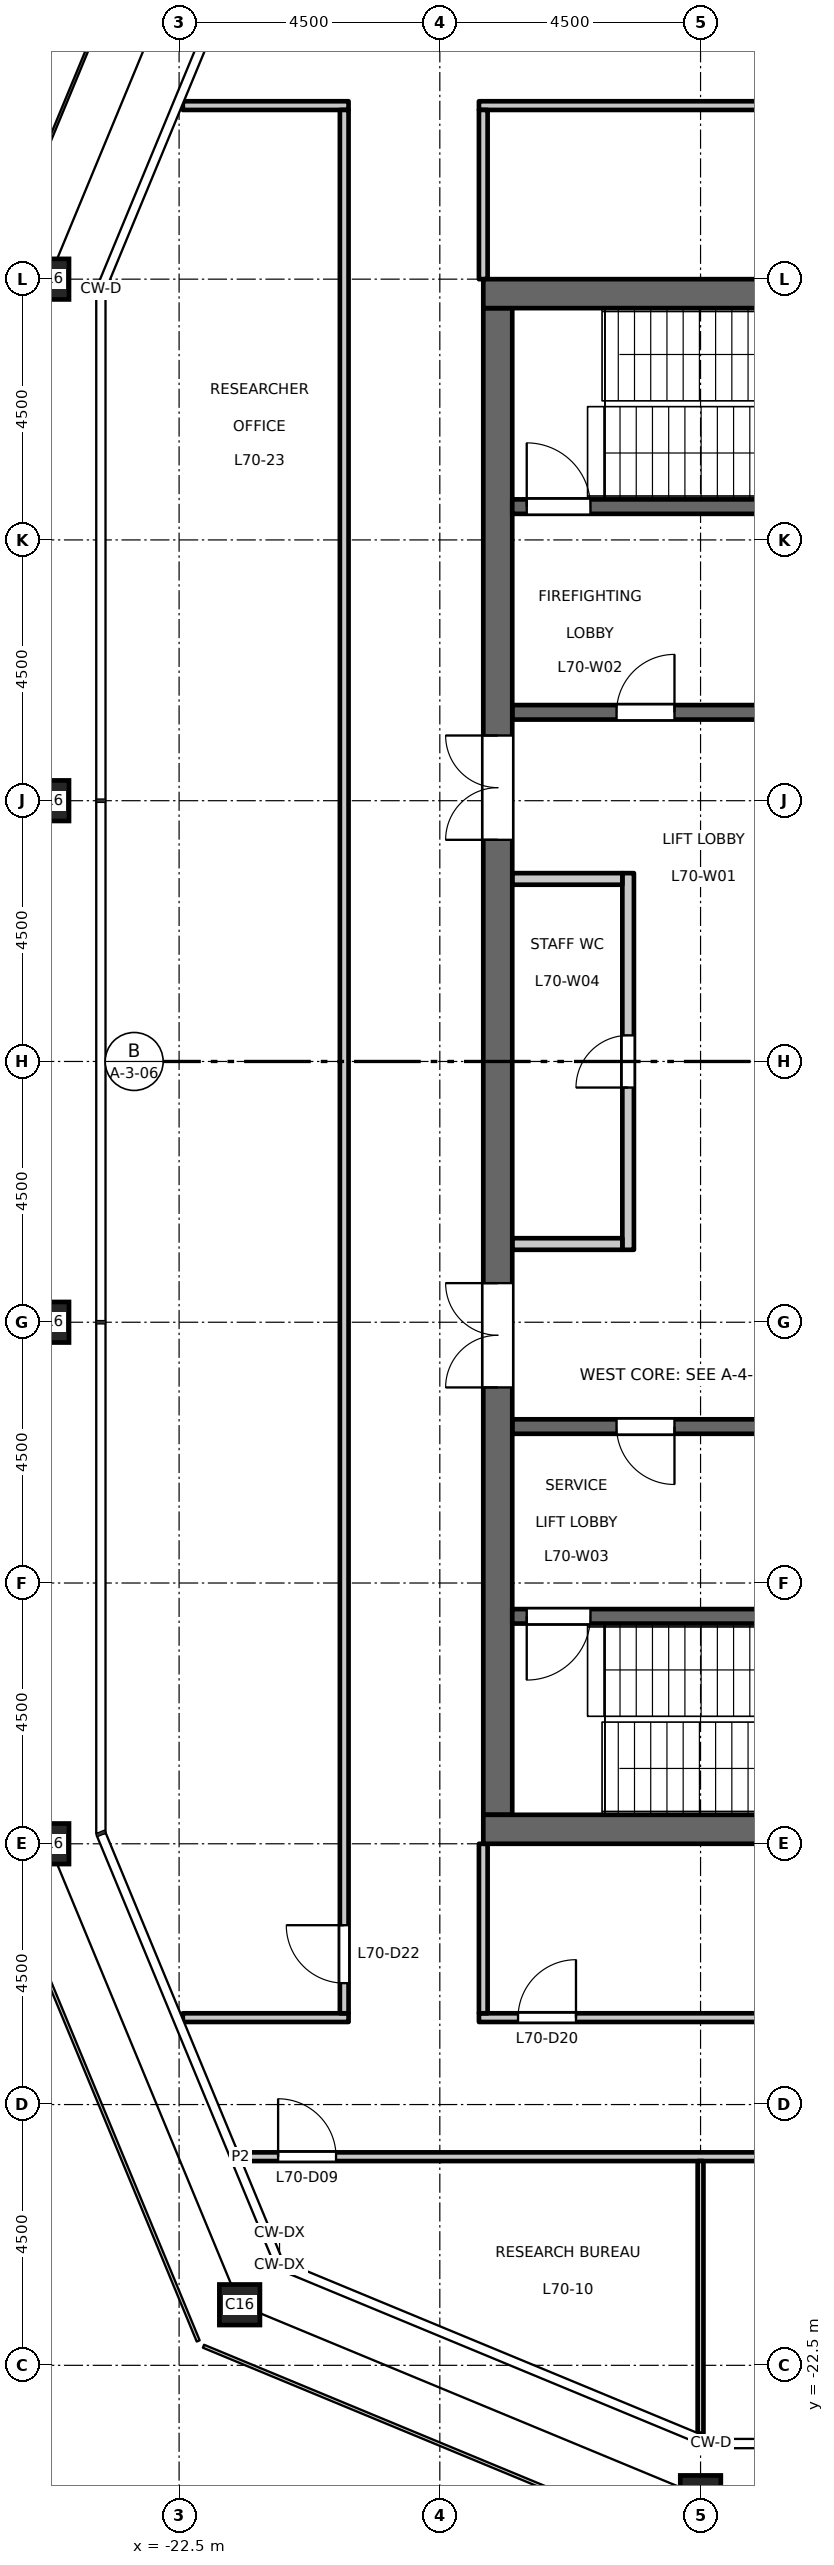
"""IFC4 building model, lengths in metres.
Left out: names, types, materials, properties, quantities, classifications, styles, units other than length and angle.
Written with IfcOpenShell. Run it as: python <this file> out.ifc"""

import sys

from ifc_helpers import new_model, si_unit, direction, frame, frame_2d, origin, origin_2d, place, context, subcontext, project, spatial, rectangle, hollow_rectangle, extrude, element, fill, save


model = new_model("IFC4")
c1 = context("Model", 3, precision=1e-05, world=origin(), true_north=direction((0.0, 1.0)))
c2 = subcontext(c1, "Body", "Model", "MODEL_VIEW")
j1 = project(units=[si_unit("LENGTHUNIT", "METRE"), si_unit("PLANEANGLEUNIT", "RADIAN")], contexts=[c1])
p1 = place(None, origin())
s1 = spatial("IfcSite", under=j1, at=p1, CompositionType="ELEMENT")
p2 = place(p1, origin())
s2 = spatial("IfcBuilding", under=s1, at=p2, CompositionType="ELEMENT")
p3 = place(p2, frame((0.0, 0.0, 325.7)))
s3 = spatial("IfcBuildingStorey", under=s2, at=p3, CompositionType="ELEMENT", Elevation=325.7)
for number, where, z_axis, x_axis in (
    (1, (-13.5, -24.75, 0.0), (0.0, 0.0, 1.0), (1.0, 0.0, 0.0)),
    (2, (-24.75, 13.5, 0.0), (0.0, 0.0, 1.0), (1.0, 0.0, 0.0)),
    (3, (-24.75, 4.5, 0.0), (0.0, 0.0, 1.0), (1.0, 0.0, 0.0)),
    (4, (-24.75, -4.5, 0.0), (0.0, 0.0, 1.0), (1.0, 0.0, 0.0)),
    (5, (-24.75, -13.5, 0.0), (0.0, 0.0, 1.0), (1.0, 0.0, 0.0)),
    (6, (-21.455, -21.455, 0.0), (0.0, 0.0, 1.0), (1.0, 0.0, 0.0)),
):
    element("IfcColumn", number, at=place(p3, frame(where, z_axis=z_axis, x_axis=x_axis)), inside=s3, PredefinedType="COLUMN", context=c2, shape_type="SweptSolid", body=[
        extrude(hollow_rectangle(XDim=0.7, YDim=0.7, WallThickness=0.036, at=origin_2d()), origin(), (0.0, 0.0, 1.0), 4.5),
    ])
p4 = place(p3, frame((-14.75, -3.25, 0.0), z_axis=(0.0, 0.0, 1.0), x_axis=(0.0, 1.0, 0.0)))
e7 = element("IfcWall", 7, at=p4, inside=s3, PredefinedType="PARTITIONING", context=c2, shape_type="SweptSolid", body=[
    extrude(rectangle(XDim=6.5, YDim=0.2, at=frame_2d((3.25, 0.0))), origin(), (0.0, 0.0, 1.0), 4.35),
])
p5 = place(p4, frame((2.8, 0.0, 0.0)))
e8 = element("IfcOpeningElement", 8, at=p5, cuts=e7, PredefinedType="OPENING", context=c2, shape_type="SweptSolid", body=[
    extrude(rectangle(XDim=0.9, YDim=2.1, at=frame_2d((0.45, 1.05))), frame((0.0, 0.11, 0.0), z_axis=(0.0, -1.0, 0.0), x_axis=(1.0, 0.0, 0.0)), (0.0, 0.0, 1.0), 0.22),
])
for number, where, z_axis, x_axis in (
    (9, (-14.85, 3.15, 0.0), (0.0, 0.0, 1.0), (-1.0, 0.0, 0.0)),
    (10, (-14.85, -3.15, 0.0), (0.0, 0.0, 1.0), (-1.0, 0.0, 0.0)),
):
    element("IfcWall", number, at=place(p3, frame(where, z_axis=z_axis, x_axis=x_axis)), inside=s3, PredefinedType="PARTITIONING", context=c2, shape_type="SweptSolid", body=[
        extrude(rectangle(XDim=1.9, YDim=0.2, at=frame_2d((0.95, 0.0))), origin(), (0.0, 0.0, 1.0), 4.35),
    ])
p6 = place(p3, frame((-12.15, 6.025, 0.0), z_axis=(0.0, 0.0, 1.0), x_axis=(-1.0, 0.0, 0.0)))
e11 = element("IfcWall", 11, at=p6, inside=s3, PredefinedType="SHEAR", context=c2, shape_type="SweptSolid", body=[
    extrude(rectangle(XDim=4.6, YDim=0.25, at=frame_2d((2.3, 0.0))), origin(), (0.0, 0.0, 1.0), 4.35),
])
p7 = place(p6, frame((1.8, 0.0, 0.0)))
e12 = element("IfcOpeningElement", 12, at=p7, cuts=e11, PredefinedType="OPENING", context=c2, shape_type="SweptSolid", body=[
    extrude(rectangle(XDim=1.0, YDim=2.1, at=frame_2d((0.5, 1.05))), frame((0.0, 0.135, 0.0), z_axis=(0.0, -1.0, 0.0), x_axis=(1.0, 0.0, 0.0)), (0.0, 0.0, 1.0), 0.27),
])
p8 = place(p3, frame((-12.15, -6.3, 0.0), z_axis=(0.0, 0.0, 1.0), x_axis=(-1.0, 0.0, 0.0)))
e13 = element("IfcWall", 13, at=p8, inside=s3, PredefinedType="SHEAR", context=c2, shape_type="SweptSolid", body=[
    extrude(rectangle(XDim=4.6, YDim=0.25, at=frame_2d((2.3, 0.0))), origin(), (0.0, 0.0, 1.0), 4.35),
])
p9 = place(p8, frame((1.8, 0.0, 0.0)))
e14 = element("IfcOpeningElement", 14, at=p9, cuts=e13, PredefinedType="OPENING", context=c2, shape_type="SweptSolid", body=[
    extrude(rectangle(XDim=1.0, YDim=2.1, at=frame_2d((0.5, 1.05))), frame((0.0, 0.135, 0.0), z_axis=(0.0, -1.0, 0.0), x_axis=(1.0, 0.0, 0.0)), (0.0, 0.0, 1.0), 0.27),
])
p10 = place(p3, frame((-17.0, -13.0, 0.0), z_axis=(0.0, 0.0, 1.0), x_axis=(0.0, 1.0, 0.0)))
e15 = element("IfcWall", 15, at=p10, inside=s3, PredefinedType="SHEAR", context=c2, shape_type="SweptSolid", body=[
    extrude(rectangle(XDim=26.0, YDim=0.5, at=frame_2d((13.0, 0.0))), origin(), (0.0, 0.0, 1.0), 4.35),
])
p11 = place(p10, frame((16.825, 0.0, 0.0)))
e16 = element("IfcOpeningElement", 16, at=p11, cuts=e15, PredefinedType="OPENING", context=c2, shape_type="SweptSolid", body=[
    extrude(rectangle(XDim=1.8, YDim=2.1, at=frame_2d((0.9, 1.05))), frame((0.0, 0.26, 0.0), z_axis=(0.0, -1.0, 0.0), x_axis=(1.0, 0.0, 0.0)), (0.0, 0.0, 1.0), 0.52),
])
p12 = place(p10, frame((7.375, 0.0, 0.0)))
e17 = element("IfcOpeningElement", 17, at=p12, cuts=e15, PredefinedType="OPENING", context=c2, shape_type="SweptSolid", body=[
    extrude(rectangle(XDim=1.8, YDim=2.1, at=frame_2d((0.9, 1.05))), frame((0.0, 0.26, 0.0), z_axis=(0.0, -1.0, 0.0), x_axis=(1.0, 0.0, 0.0)), (0.0, 0.0, 1.0), 0.52),
])
p13 = place(p3, frame((-8.75, 9.575, 0.0), z_axis=(0.0, 0.0, 1.0), x_axis=(-1.0, 0.0, 0.0)))
e18 = element("IfcWall", 18, at=p13, inside=s3, PredefinedType="SHEAR", context=c2, shape_type="SweptSolid", body=[
    extrude(rectangle(XDim=8.0, YDim=0.25, at=frame_2d((4.0, 0.0))), origin(), (0.0, 0.0, 1.0), 4.35),
])
p14 = place(p13, frame((6.65, 0.0, 0.0)))
e19 = element("IfcOpeningElement", 19, at=p14, cuts=e18, PredefinedType="OPENING", context=c2, shape_type="SweptSolid", body=[
    extrude(rectangle(XDim=1.1, YDim=2.1, at=frame_2d((0.55, 1.05))), frame((0.0, 0.135, 0.0), z_axis=(0.0, -1.0, 0.0), x_axis=(1.0, 0.0, 0.0)), (0.0, 0.0, 1.0), 0.27),
])
p15 = place(p3, frame((-8.75, -9.575, 0.0), z_axis=(0.0, 0.0, 1.0), x_axis=(-1.0, 0.0, 0.0)))
e20 = element("IfcWall", 20, at=p15, inside=s3, PredefinedType="SHEAR", context=c2, shape_type="SweptSolid", body=[
    extrude(rectangle(XDim=8.0, YDim=0.25, at=frame_2d((4.0, 0.0))), origin(), (0.0, 0.0, 1.0), 4.35),
])
p16 = place(p15, frame((6.65, 0.0, 0.0)))
e21 = element("IfcOpeningElement", 21, at=p16, cuts=e20, PredefinedType="OPENING", context=c2, shape_type="SweptSolid", body=[
    extrude(rectangle(XDim=1.1, YDim=2.1, at=frame_2d((0.55, 1.05))), frame((0.0, 0.135, 0.0), z_axis=(0.0, -1.0, 0.0), x_axis=(1.0, 0.0, 0.0)), (0.0, 0.0, 1.0), 0.27),
])
for number, where, z_axis, x_axis in (
    (22, (-8.25, 13.25, 0.0), (0.0, 0.0, 1.0), (-1.0, 0.0, 0.0)),
    (23, (-8.25, -13.25, 0.0), (0.0, 0.0, 1.0), (-1.0, 0.0, 0.0)),
):
    element("IfcWall", number, at=place(p3, frame(where, z_axis=z_axis, x_axis=x_axis)), inside=s3, PredefinedType="SHEAR", context=c2, shape_type="SweptSolid", body=[
        extrude(rectangle(XDim=9.0, YDim=0.5, at=frame_2d((4.5, 0.0))), origin(), (0.0, 0.0, 1.0), 4.35),
    ])
p17 = place(p3, frame((-21.441, -18.9, 0.0), z_axis=(0.0, 0.0, 1.0), x_axis=(1.0, 0.0, 0.0)))
e24 = element("IfcWall", 24, at=p17, inside=s3, PredefinedType="PARTITIONING", context=c2, shape_type="SweptSolid", body=[
    extrude(rectangle(XDim=42.882, YDim=0.15, at=frame_2d((21.441, 0.0))), origin(), (0.0, 0.0, 1.0), 4.35),
])
p18 = place(p17, frame((15.341, 0.0, 0.0)))
e25 = element("IfcOpeningElement", 25, at=p18, cuts=e24, PredefinedType="OPENING", context=c2, shape_type="SweptSolid", body=[
    extrude(rectangle(XDim=1.0, YDim=2.1, at=frame_2d((0.5, 1.05))), frame((0.0, 0.085, 0.0), z_axis=(0.0, -1.0, 0.0), x_axis=(1.0, 0.0, 0.0)), (0.0, 0.0, 1.0), 0.17),
])
p19 = place(p17, frame((17.591, 0.0, 0.0)))
e26 = element("IfcOpeningElement", 26, at=p19, cuts=e24, PredefinedType="OPENING", context=c2, shape_type="SweptSolid", body=[
    extrude(rectangle(XDim=1.0, YDim=2.1, at=frame_2d((0.5, 1.05))), frame((0.0, 0.085, 0.0), z_axis=(0.0, -1.0, 0.0), x_axis=(1.0, 0.0, 0.0)), (0.0, 0.0, 1.0), 0.17),
])
p20 = place(p17, frame((33.341, 0.0, 0.0)))
e27 = element("IfcOpeningElement", 27, at=p20, cuts=e24, PredefinedType="OPENING", context=c2, shape_type="SweptSolid", body=[
    extrude(rectangle(XDim=1.0, YDim=2.1, at=frame_2d((0.5, 1.05))), frame((0.0, 0.085, 0.0), z_axis=(0.0, -1.0, 0.0), x_axis=(1.0, 0.0, 0.0)), (0.0, 0.0, 1.0), 0.17),
])
p21 = place(p17, frame((0.65, 0.0, 0.0)))
e28 = element("IfcOpeningElement", 28, at=p21, cuts=e24, PredefinedType="OPENING", context=c2, shape_type="SweptSolid", body=[
    extrude(rectangle(XDim=1.0, YDim=2.1, at=frame_2d((0.5, 1.05))), frame((0.0, 0.085, 0.0), z_axis=(0.0, -1.0, 0.0), x_axis=(1.0, 0.0, 0.0)), (0.0, 0.0, 1.0), 0.17),
])
p22 = place(p17, frame((41.341, 0.0, 0.0)))
e29 = element("IfcOpeningElement", 29, at=p22, cuts=e24, PredefinedType="OPENING", context=c2, shape_type="SweptSolid", body=[
    extrude(rectangle(XDim=1.0, YDim=2.1, at=frame_2d((0.5, 1.05))), frame((0.0, 0.085, 0.0), z_axis=(0.0, -1.0, 0.0), x_axis=(1.0, 0.0, 0.0)), (0.0, 0.0, 1.0), 0.17),
])
p23 = place(p3, frame((-22.436, -16.5, 0.0), z_axis=(0.0, 0.0, 1.0), x_axis=(1.0, 0.0, 0.0)))
e30 = element("IfcWall", 30, at=p23, inside=s3, PredefinedType="PARTITIONING", context=c2, shape_type="SweptSolid", body=[
    extrude(rectangle(XDim=2.861, YDim=0.15, at=frame_2d((1.431, 0.0))), origin(), (0.0, 0.0, 1.0), 4.35),
])
p24 = place(p3, frame((-17.325, -16.5, 0.0), z_axis=(0.0, 0.0, 1.0), x_axis=(1.0, 0.0, 0.0)))
e31 = element("IfcWall", 31, at=p24, inside=s3, PredefinedType="PARTITIONING", context=c2, shape_type="SweptSolid", body=[
    extrude(rectangle(XDim=34.65, YDim=0.15, at=frame_2d((17.325, 0.0))), origin(), (0.0, 0.0, 1.0), 4.35),
])
p25 = place(p24, frame((9.675, 0.0, 0.0)))
e32 = element("IfcOpeningElement", 32, at=p25, cuts=e31, PredefinedType="OPENING", context=c2, shape_type="SweptSolid", body=[
    extrude(rectangle(XDim=1.0, YDim=2.1, at=frame_2d((0.5, 1.05))), frame((0.0, 0.085, 0.0), z_axis=(0.0, -1.0, 0.0), x_axis=(1.0, 0.0, 0.0)), (0.0, 0.0, 1.0), 0.17),
])
p26 = place(p24, frame((23.925, 0.0, 0.0)))
e33 = element("IfcOpeningElement", 33, at=p26, cuts=e31, PredefinedType="OPENING", context=c2, shape_type="SweptSolid", body=[
    extrude(rectangle(XDim=1.0, YDim=2.1, at=frame_2d((0.5, 1.05))), frame((0.0, 0.085, 0.0), z_axis=(0.0, -1.0, 0.0), x_axis=(1.0, 0.0, 0.0)), (0.0, 0.0, 1.0), 0.17),
])
p27 = place(p24, frame((0.675, 0.0, 0.0)))
e34 = element("IfcOpeningElement", 34, at=p27, cuts=e31, PredefinedType="OPENING", context=c2, shape_type="SweptSolid", body=[
    extrude(rectangle(XDim=1.0, YDim=2.1, at=frame_2d((0.5, 1.05))), frame((0.0, 0.085, 0.0), z_axis=(0.0, -1.0, 0.0), x_axis=(1.0, 0.0, 0.0)), (0.0, 0.0, 1.0), 0.17),
])
p28 = place(p24, frame((32.925, 0.0, 0.0)))
e35 = element("IfcOpeningElement", 35, at=p28, cuts=e31, PredefinedType="OPENING", context=c2, shape_type="SweptSolid", body=[
    extrude(rectangle(XDim=1.0, YDim=2.1, at=frame_2d((0.5, 1.05))), frame((0.0, 0.085, 0.0), z_axis=(0.0, -1.0, 0.0), x_axis=(1.0, 0.0, 0.0)), (0.0, 0.0, 1.0), 0.17),
])
p29 = place(p3, frame((-22.436, 16.495, 0.0), z_axis=(0.0, 0.0, 1.0), x_axis=(1.0, 0.0, 0.0)))
e36 = element("IfcWall", 36, at=p29, inside=s3, PredefinedType="PARTITIONING", context=c2, shape_type="SweptSolid", body=[
    extrude(rectangle(XDim=2.861, YDim=0.15, at=frame_2d((1.431, 0.0))), origin(), (0.0, 0.0, 1.0), 4.35),
])
p30 = place(p3, frame((-17.325, 16.495, 0.0), z_axis=(0.0, 0.0, 1.0), x_axis=(1.0, 0.0, 0.0)))
e37 = element("IfcWall", 37, at=p30, inside=s3, PredefinedType="PARTITIONING", context=c2, shape_type="SweptSolid", body=[
    extrude(rectangle(XDim=34.65, YDim=0.15, at=frame_2d((17.325, 0.0))), origin(), (0.0, 0.0, 1.0), 4.35),
])
p31 = place(p30, frame((9.725, 0.0, 0.0)))
e38 = element("IfcOpeningElement", 38, at=p31, cuts=e37, PredefinedType="OPENING", context=c2, shape_type="SweptSolid", body=[
    extrude(rectangle(XDim=1.0, YDim=2.1, at=frame_2d((0.5, 1.05))), frame((0.0, 0.085, 0.0), z_axis=(0.0, -1.0, 0.0), x_axis=(1.0, 0.0, 0.0)), (0.0, 0.0, 1.0), 0.17),
])
p32 = place(p30, frame((7.475, 0.0, 0.0)))
e39 = element("IfcOpeningElement", 39, at=p32, cuts=e37, PredefinedType="OPENING", context=c2, shape_type="SweptSolid", body=[
    extrude(rectangle(XDim=1.0, YDim=2.1, at=frame_2d((0.5, 1.05))), frame((0.0, 0.085, 0.0), z_axis=(0.0, -1.0, 0.0), x_axis=(1.0, 0.0, 0.0)), (0.0, 0.0, 1.0), 0.17),
])
p33 = place(p30, frame((26.225, 0.0, 0.0)))
e40 = element("IfcOpeningElement", 40, at=p33, cuts=e37, PredefinedType="OPENING", context=c2, shape_type="SweptSolid", body=[
    extrude(rectangle(XDim=1.0, YDim=2.1, at=frame_2d((0.5, 1.05))), frame((0.0, 0.085, 0.0), z_axis=(0.0, -1.0, 0.0), x_axis=(1.0, 0.0, 0.0)), (0.0, 0.0, 1.0), 0.17),
])
p34 = place(p3, frame((-19.65, -16.425, 0.0), z_axis=(0.0, 0.0, 1.0), x_axis=(0.0, 1.0, 0.0)))
e41 = element("IfcWall", 41, at=p34, inside=s3, PredefinedType="PARTITIONING", context=c2, shape_type="SweptSolid", body=[
    extrude(rectangle(XDim=32.845, YDim=0.15, at=frame_2d((16.422, 0.0))), origin(), (0.0, 0.0, 1.0), 4.35),
])
p35 = place(p34, frame((0.52, 0.0, 0.0)))
e42 = element("IfcOpeningElement", 42, at=p35, cuts=e41, PredefinedType="OPENING", context=c2, shape_type="SweptSolid", body=[
    extrude(rectangle(XDim=1.0, YDim=2.1, at=frame_2d((0.5, 1.05))), frame((0.0, 0.085, 0.0), z_axis=(0.0, -1.0, 0.0), x_axis=(1.0, 0.0, 0.0)), (0.0, 0.0, 1.0), 0.17),
])
p36 = place(p3, frame((-17.25, -16.425, 0.0), z_axis=(0.0, 0.0, 1.0), x_axis=(0.0, 1.0, 0.0)))
e43 = element("IfcWall", 43, at=p36, inside=s3, PredefinedType="PARTITIONING", context=c2, shape_type="SweptSolid", body=[
    extrude(rectangle(XDim=2.925, YDim=0.15, at=frame_2d((1.462, 0.0))), origin(), (0.0, 0.0, 1.0), 4.35),
])
p37 = place(p3, frame((-17.25, 13.5, 0.0), z_axis=(0.0, 0.0, 1.0), x_axis=(0.0, 1.0, 0.0)))
e44 = element("IfcWall", 44, at=p37, inside=s3, PredefinedType="PARTITIONING", context=c2, shape_type="SweptSolid", body=[
    extrude(rectangle(XDim=2.92, YDim=0.15, at=frame_2d((1.46, 0.0))), origin(), (0.0, 0.0, 1.0), 4.35),
])
p38 = place(p3, frame((-13.5, -23.678, 0.0), z_axis=(0.0, 0.0, 1.0), x_axis=(0.0, 1.0, 0.0)))
e45 = element("IfcWall", 45, at=p38, inside=s3, PredefinedType="PARTITIONING", context=c2, shape_type="SweptSolid", body=[
    extrude(rectangle(XDim=4.703, YDim=0.1, at=frame_2d((2.352, 0.0))), origin(), (0.0, 0.0, 1.0), 3.75),
])
p39 = place(p7, origin())
e46 = element("IfcDoor", 46, at=p39, inside=s3, OperationType="SINGLE_SWING_LEFT", PredefinedType="DOOR", context=c2, shape_type="SweptSolid", body=[
    extrude(rectangle(XDim=1.0, YDim=2.1, at=frame_2d((0.5, 1.05))), frame((0.0, 0.025, 0.0), z_axis=(0.0, -1.0, 0.0), x_axis=(1.0, 0.0, 0.0)), (0.0, 0.0, 1.0), 0.05),
])
fill(e12, e46)
p40 = place(p9, origin())
e47 = element("IfcDoor", 47, at=p40, inside=s3, OperationType="SINGLE_SWING_RIGHT", PredefinedType="DOOR", context=c2, shape_type="SweptSolid", body=[
    extrude(rectangle(XDim=1.0, YDim=2.1, at=frame_2d((0.5, 1.05))), frame((0.0, 0.025, 0.0), z_axis=(0.0, -1.0, 0.0), x_axis=(1.0, 0.0, 0.0)), (0.0, 0.0, 1.0), 0.05),
])
fill(e14, e47)
p41 = place(p14, origin())
e48 = element("IfcDoor", 48, at=p41, inside=s3, OperationType="SINGLE_SWING_RIGHT", PredefinedType="DOOR", context=c2, shape_type="SweptSolid", body=[
    extrude(rectangle(XDim=1.1, YDim=2.1, at=frame_2d((0.55, 1.05))), frame((0.0, 0.025, 0.0), z_axis=(0.0, -1.0, 0.0), x_axis=(1.0, 0.0, 0.0)), (0.0, 0.0, 1.0), 0.05),
])
fill(e19, e48)
p42 = place(p16, origin())
e49 = element("IfcDoor", 49, at=p42, inside=s3, OperationType="SINGLE_SWING_LEFT", PredefinedType="DOOR", context=c2, shape_type="SweptSolid", body=[
    extrude(rectangle(XDim=1.1, YDim=2.1, at=frame_2d((0.55, 1.05))), frame((0.0, 0.025, 0.0), z_axis=(0.0, -1.0, 0.0), x_axis=(1.0, 0.0, 0.0)), (0.0, 0.0, 1.0), 0.05),
])
fill(e21, e49)
p43 = place(p11, origin())
e50 = element("IfcDoor", 50, at=p43, inside=s3, OperationType="DOUBLE_DOOR_DOUBLE_SWING", PredefinedType="DOOR", context=c2, shape_type="SweptSolid", body=[
    extrude(rectangle(XDim=1.8, YDim=2.1, at=frame_2d((0.9, 1.05))), frame((0.0, 0.025, 0.0), z_axis=(0.0, -1.0, 0.0), x_axis=(1.0, 0.0, 0.0)), (0.0, 0.0, 1.0), 0.05),
])
fill(e16, e50)
p44 = place(p12, origin())
e51 = element("IfcDoor", 51, at=p44, inside=s3, OperationType="DOUBLE_DOOR_DOUBLE_SWING", PredefinedType="DOOR", context=c2, shape_type="SweptSolid", body=[
    extrude(rectangle(XDim=1.8, YDim=2.1, at=frame_2d((0.9, 1.05))), frame((0.0, 0.025, 0.0), z_axis=(0.0, -1.0, 0.0), x_axis=(1.0, 0.0, 0.0)), (0.0, 0.0, 1.0), 0.05),
])
fill(e17, e51)
p45 = place(p5, origin())
e52 = element("IfcDoor", 52, at=p45, inside=s3, OperationType="SINGLE_SWING_RIGHT", PredefinedType="DOOR", context=c2, shape_type="SweptSolid", body=[
    extrude(rectangle(XDim=0.9, YDim=2.1, at=frame_2d((0.45, 1.05))), frame((0.0, 0.025, 0.0), z_axis=(0.0, -1.0, 0.0), x_axis=(1.0, 0.0, 0.0)), (0.0, 0.0, 1.0), 0.05),
])
fill(e8, e52)
p46 = place(p21, origin())
e53 = element("IfcDoor", 53, at=p46, inside=s3, OperationType="SINGLE_SWING_LEFT", PredefinedType="DOOR", context=c2, shape_type="SweptSolid", body=[
    extrude(rectangle(XDim=1.0, YDim=2.1, at=frame_2d((0.5, 1.05))), frame((0.0, 0.025, 0.0), z_axis=(0.0, -1.0, 0.0), x_axis=(1.0, 0.0, 0.0)), (0.0, 0.0, 1.0), 0.05),
])
fill(e28, e53)
p47 = place(p27, origin())
e54 = element("IfcDoor", 54, at=p47, inside=s3, OperationType="SINGLE_SWING_RIGHT", PredefinedType="DOOR", context=c2, shape_type="SweptSolid", body=[
    extrude(rectangle(XDim=1.0, YDim=2.1, at=frame_2d((0.5, 1.05))), frame((0.0, 0.025, 0.0), z_axis=(0.0, -1.0, 0.0), x_axis=(1.0, 0.0, 0.0)), (0.0, 0.0, 1.0), 0.05),
])
fill(e34, e54)
p48 = place(p35, origin())
e55 = element("IfcDoor", 55, at=p48, inside=s3, OperationType="SINGLE_SWING_RIGHT", PredefinedType="DOOR", context=c2, shape_type="SweptSolid", body=[
    extrude(rectangle(XDim=1.0, YDim=2.1, at=frame_2d((0.5, 1.05))), frame((0.0, 0.025, 0.0), z_axis=(0.0, -1.0, 0.0), x_axis=(1.0, 0.0, 0.0)), (0.0, 0.0, 1.0), 0.05),
])
fill(e42, e55)
save(model, sys.argv[1])
